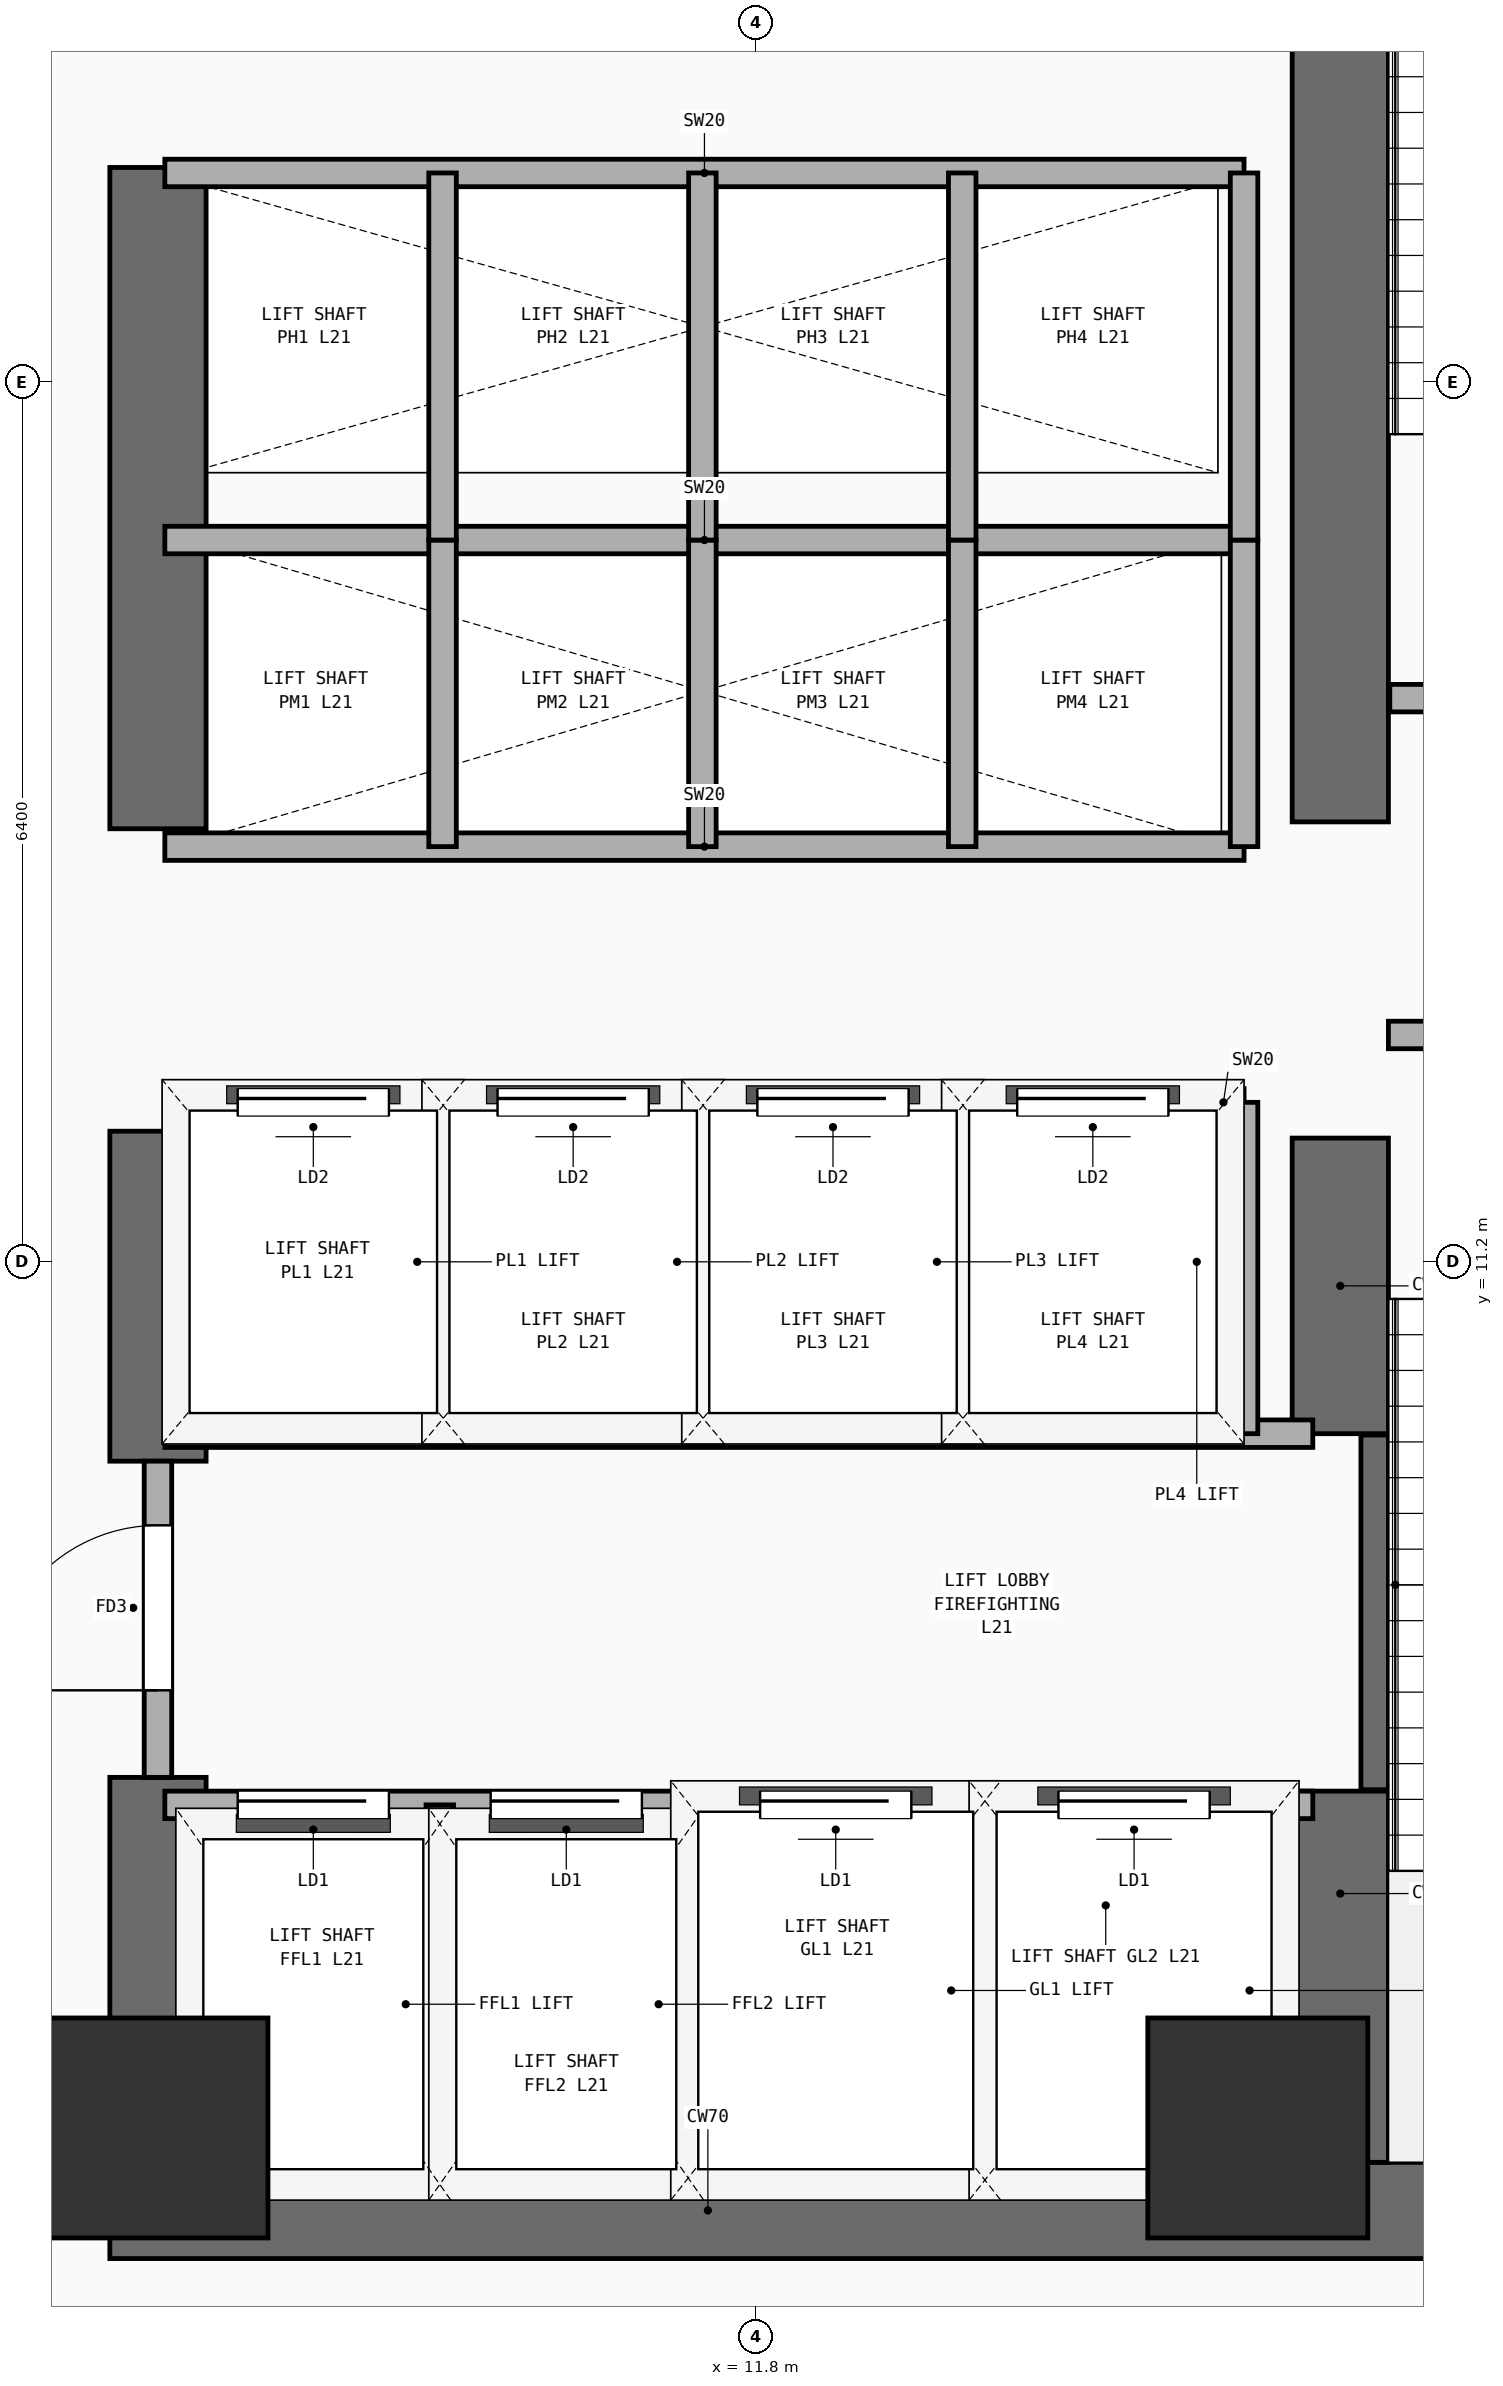
"""IFC4 building model, lengths in metres.
Left out: names, types, materials, properties, quantities, classifications, styles, units other than length and angle.
Written with IfcOpenShell. Run it as: python <this file> out.ifc"""

import sys

from ifc_helpers import new_model, si_unit, direction, frame, frame_2d, origin, origin_2d, place, context, subcontext, project, spatial, rectangle, extrude, element, fill, save


model = new_model("IFC4")
c1 = context("Model", 3, precision=1e-05, world=origin(), true_north=direction((0.0, 1.0)))
c2 = subcontext(c1, "Body", "Model", "MODEL_VIEW")
j1 = project(units=[si_unit("LENGTHUNIT", "METRE"), si_unit("PLANEANGLEUNIT", "RADIAN")], contexts=[c1])
p1 = place(None, origin())
s1 = spatial("IfcSite", under=j1, at=p1, CompositionType="ELEMENT")
p2 = place(p1, origin())
s2 = spatial("IfcBuilding", under=s1, at=p2, CompositionType="ELEMENT")
p3 = place(p2, frame((0.0, 0.0, 82.8)))
s3 = spatial("IfcBuildingStorey", under=s2, at=p3, CompositionType="ELEMENT", Elevation=82.8)
p4 = place(p3, frame((7.1, 4.3, 0.0), z_axis=(0.0, 0.0, 1.0), x_axis=(1.0, 0.0, 0.0)))
e1 = element("IfcWall", 1, at=p4, inside=s3, PredefinedType="SHEAR", context=c2, shape_type="SweptSolid", body=[
    extrude(rectangle(XDim=14.05, YDim=0.7, at=frame_2d((7.025, 0.0))), origin(), (0.0, 0.0, 1.0), 4.84),
])
p5 = place(p3, frame((7.45, 4.65, 0.0), z_axis=(0.0, 0.0, 1.0), x_axis=(0.0, 1.0, 0.0)))
e2 = element("IfcWall", 2, at=p5, inside=s3, PredefinedType="SHEAR", context=c2, shape_type="SweptSolid", body=[
    extrude(rectangle(XDim=2.8, YDim=0.7, at=frame_2d((1.4, 0.0))), origin(), (0.0, 0.0, 1.0), 4.84),
])
p6 = place(p3, frame((7.45, 9.75, 0.0), z_axis=(0.0, 0.0, 1.0), x_axis=(0.0, 1.0, 0.0)))
e3 = element("IfcWall", 3, at=p6, inside=s3, PredefinedType="SHEAR", context=c2, shape_type="SweptSolid", body=[
    extrude(rectangle(XDim=2.4, YDim=0.7, at=frame_2d((1.2, 0.0))), origin(), (0.0, 0.0, 1.0), 4.84),
])
p7 = place(p3, frame((7.45, 14.35, 0.0), z_axis=(0.0, 0.0, 1.0), x_axis=(0.0, 1.0, 0.0)))
e4 = element("IfcWall", 4, at=p7, inside=s3, PredefinedType="SHEAR", context=c2, shape_type="SweptSolid", body=[
    extrude(rectangle(XDim=4.81, YDim=0.7, at=frame_2d((2.405, 0.0))), origin(), (0.0, 0.0, 1.0), 4.84),
])
p8 = place(p3, frame((16.05, 4.65, 0.0), z_axis=(0.0, 0.0, 1.0), x_axis=(0.0, 1.0, 0.0)))
e5 = element("IfcWall", 5, at=p8, inside=s3, PredefinedType="SHEAR", context=c2, shape_type="SweptSolid", body=[
    extrude(rectangle(XDim=2.7, YDim=0.7, at=frame_2d((1.35, 0.0))), origin(), (0.0, 0.0, 1.0), 4.84),
])
p9 = place(p3, frame((16.05, 9.95, 0.0), z_axis=(0.0, 0.0, 1.0), x_axis=(0.0, 1.0, 0.0)))
e6 = element("IfcWall", 6, at=p9, inside=s3, PredefinedType="SHEAR", context=c2, shape_type="SweptSolid", body=[
    extrude(rectangle(XDim=2.15, YDim=0.7, at=frame_2d((1.075, 0.0))), origin(), (0.0, 0.0, 1.0), 4.84),
])
p10 = place(p3, frame((16.05, 14.4, 0.0), z_axis=(0.0, 0.0, 1.0), x_axis=(0.0, 1.0, 0.0)))
e7 = element("IfcWall", 7, at=p10, inside=s3, PredefinedType="SHEAR", context=c2, shape_type="SweptSolid", body=[
    extrude(rectangle(XDim=9.1, YDim=0.7, at=frame_2d((4.55, 0.0))), origin(), (0.0, 0.0, 1.0), 4.84),
])
for number, where, z_axis, x_axis in (
    (8, (7.45, 4.9, 0.0), (0.0, 0.0, 1.0), (1.0, 0.0, 0.0)),
    (9, (15.45, 4.9, 0.0), (0.0, 0.0, 1.0), (1.0, 0.0, 0.0)),
):
    element("IfcColumn", number, at=place(p3, frame(where, z_axis=z_axis, x_axis=x_axis)), inside=s3, PredefinedType="COLUMN", context=c2, shape_type="SweptSolid", body=[
        extrude(rectangle(XDim=1.6, YDim=1.6, at=origin_2d()), origin(), (0.0, 0.0, 1.0), 4.84),
    ])
p11 = place(p3, frame((16.3, 7.36, 0.0), z_axis=(0.0, 0.0, 1.0), x_axis=(0.0, 1.0, 0.0)))
e10 = element("IfcWall", 10, at=p11, inside=s3, PredefinedType="SHEAR", context=c2, shape_type="SweptSolid", body=[
    extrude(rectangle(XDim=2.58, YDim=0.2, at=frame_2d((1.29, 0.0))), origin(), (0.0, 0.0, 1.0), 4.84),
])
p12 = place(p3, frame((16.4, 12.85, 0.0), z_axis=(0.0, 0.0, 1.0), x_axis=(1.0, 0.0, 0.0)))
e11 = element("IfcWall", 11, at=p12, inside=s3, PredefinedType="PARTITIONING", context=c2, shape_type="SweptSolid", body=[
    extrude(rectangle(XDim=3.96, YDim=0.2, at=frame_2d((1.98, 0.0))), origin(), (0.0, 0.0, 1.0), 4.84),
])
p13 = place(p12, frame((1.304, 0.0, 0.0)))
e12 = element("IfcOpeningElement", 12, at=p13, cuts=e11, PredefinedType="OPENING", context=c2, shape_type="SweptSolid", body=[
    extrude(rectangle(XDim=1.1, YDim=2.2, at=frame_2d((0.55, 1.1))), frame((0.0, 0.11, 0.0), z_axis=(0.0, -1.0, 0.0), x_axis=(1.0, 0.0, 0.0)), (0.0, 0.0, 1.0), 0.22),
])
p14 = place(p3, frame((16.41, 15.3, 0.0), z_axis=(0.0, 0.0, 1.0), x_axis=(1.0, 0.0, 0.0)))
e13 = element("IfcWall", 13, at=p14, inside=s3, PredefinedType="PARTITIONING", context=c2, shape_type="SweptSolid", body=[
    extrude(rectangle(XDim=3.95, YDim=0.2, at=frame_2d((1.975, 0.0))), origin(), (0.0, 0.0, 1.0), 4.84),
])
p15 = place(p14, frame((1.294, 0.0, 0.0)))
e14 = element("IfcOpeningElement", 14, at=p15, cuts=e13, PredefinedType="OPENING", context=c2, shape_type="SweptSolid", body=[
    extrude(rectangle(XDim=1.1, YDim=2.2, at=frame_2d((0.55, 1.1))), frame((0.0, 0.11, 0.0), z_axis=(0.0, -1.0, 0.0), x_axis=(1.0, 0.0, 0.0)), (0.0, 0.0, 1.0), 0.22),
])
p16 = place(p3, frame((7.5, 7.25, 0.0), z_axis=(0.0, 0.0, 1.0), x_axis=(1.0, 0.0, 0.0)))
e15 = element("IfcWall", 15, at=p16, inside=s3, PredefinedType="PARTITIONING", context=c2, shape_type="SweptSolid", body=[
    extrude(rectangle(XDim=8.35, YDim=0.2, at=frame_2d((4.175, 0.0))), origin(), (0.0, 0.0, 1.0), 4.84),
])
p17 = place(p16, frame((0.53, 0.0, 0.0)))
e16 = element("IfcOpeningElement", 16, at=p17, cuts=e15, PredefinedType="OPENING", context=c2, shape_type="SweptSolid", body=[
    extrude(rectangle(XDim=1.1, YDim=2.2, at=frame_2d((0.55, 1.1))), frame((0.0, 0.11, 0.0), z_axis=(0.0, -1.0, 0.0), x_axis=(1.0, 0.0, 0.0)), (0.0, 0.0, 1.0), 0.22),
])
p18 = place(p16, frame((2.37, 0.0, 0.0)))
e17 = element("IfcOpeningElement", 17, at=p18, cuts=e15, PredefinedType="OPENING", context=c2, shape_type="SweptSolid", body=[
    extrude(rectangle(XDim=1.1, YDim=2.2, at=frame_2d((0.55, 1.1))), frame((0.0, 0.11, 0.0), z_axis=(0.0, -1.0, 0.0), x_axis=(1.0, 0.0, 0.0)), (0.0, 0.0, 1.0), 0.22),
])
p19 = place(p16, frame((4.33, 0.0, 0.0)))
e18 = element("IfcOpeningElement", 18, at=p19, cuts=e15, PredefinedType="OPENING", context=c2, shape_type="SweptSolid", body=[
    extrude(rectangle(XDim=1.1, YDim=2.2, at=frame_2d((0.55, 1.1))), frame((0.0, 0.11, 0.0), z_axis=(0.0, -1.0, 0.0), x_axis=(1.0, 0.0, 0.0)), (0.0, 0.0, 1.0), 0.22),
])
p20 = place(p16, frame((6.5, 0.0, 0.0)))
e19 = element("IfcOpeningElement", 19, at=p20, cuts=e15, PredefinedType="OPENING", context=c2, shape_type="SweptSolid", body=[
    extrude(rectangle(XDim=1.1, YDim=2.2, at=frame_2d((0.55, 1.1))), frame((0.0, 0.11, 0.0), z_axis=(0.0, -1.0, 0.0), x_axis=(1.0, 0.0, 0.0)), (0.0, 0.0, 1.0), 0.22),
])
p21 = place(p3, frame((7.5, 9.95, 0.0), z_axis=(0.0, 0.0, 1.0), x_axis=(1.0, 0.0, 0.0)))
e20 = element("IfcWall", 20, at=p21, inside=s3, PredefinedType="PARTITIONING", context=c2, shape_type="SweptSolid", body=[
    extrude(rectangle(XDim=8.35, YDim=0.2, at=frame_2d((4.175, 0.0))), origin(), (0.0, 0.0, 1.0), 4.84),
])
for number, where, z_axis, x_axis in (
    (21, (9.5, 4.45, 0.0), (0.0, 0.0, 1.0), (0.0, 1.0, 0.0)),
    (22, (11.36, 4.45, 0.0), (0.0, 0.0, 1.0), (0.0, 1.0, 0.0)),
    (23, (13.46, 4.45, 0.0), (0.0, 0.0, 1.0), (0.0, 1.0, 0.0)),
):
    element("IfcWall", number, at=place(p3, frame(where, z_axis=z_axis, x_axis=x_axis)), inside=s3, PredefinedType="PARTITIONING", context=c2, shape_type="SweptSolid", body=[
        extrude(rectangle(XDim=2.8, YDim=0.2, at=frame_2d((1.4, 0.0))), origin(), (0.0, 0.0, 1.0), 4.84),
    ])
p22 = place(p3, frame((7.45, 7.45, 0.0), z_axis=(0.0, 0.0, 1.0), x_axis=(0.0, 1.0, 0.0)))
e24 = element("IfcWall", 24, at=p22, inside=s3, PredefinedType="PARTITIONING", context=c2, shape_type="SweptSolid", body=[
    extrude(rectangle(XDim=2.3, YDim=0.2, at=frame_2d((1.15, 0.0))), origin(), (0.0, 0.0, 1.0), 3.62),
])
p23 = place(p22, frame((0.633, 0.0, 0.0)))
e25 = element("IfcOpeningElement", 25, at=p23, cuts=e24, PredefinedType="OPENING", context=c2, shape_type="SweptSolid", body=[
    extrude(rectangle(XDim=1.2, YDim=2.25, at=frame_2d((0.6, 1.125))), frame((0.0, 0.11, 0.0), z_axis=(0.0, -1.0, 0.0), x_axis=(1.0, 0.0, 0.0)), (0.0, 0.0, 1.0), 0.22),
])
p24 = place(p3, frame((7.5, 12.36, 0.0), z_axis=(0.0, 0.0, 1.0), x_axis=(1.0, 0.0, 0.0)))
e26 = element("IfcWall", 26, at=p24, inside=s3, PredefinedType="PARTITIONING", context=c2, shape_type="SweptSolid", body=[
    extrude(rectangle(XDim=7.85, YDim=0.2, at=frame_2d((3.925, 0.0))), origin(), (0.0, 0.0, 1.0), 4.84),
])
p25 = place(p24, frame((0.53, 0.0, 0.0)))
e27 = element("IfcOpeningElement", 27, at=p25, cuts=e26, PredefinedType="OPENING", context=c2, shape_type="SweptSolid", body=[
    extrude(rectangle(XDim=1.1, YDim=2.2, at=frame_2d((0.55, 1.1))), frame((0.0, 0.11, 0.0), z_axis=(0.0, -1.0, 0.0), x_axis=(1.0, 0.0, 0.0)), (0.0, 0.0, 1.0), 0.22),
])
p26 = place(p24, frame((2.42, 0.0, 0.0)))
e28 = element("IfcOpeningElement", 28, at=p26, cuts=e26, PredefinedType="OPENING", context=c2, shape_type="SweptSolid", body=[
    extrude(rectangle(XDim=1.1, YDim=2.2, at=frame_2d((0.55, 1.1))), frame((0.0, 0.11, 0.0), z_axis=(0.0, -1.0, 0.0), x_axis=(1.0, 0.0, 0.0)), (0.0, 0.0, 1.0), 0.22),
])
p27 = place(p24, frame((4.31, 0.0, 0.0)))
e29 = element("IfcOpeningElement", 29, at=p27, cuts=e26, PredefinedType="OPENING", context=c2, shape_type="SweptSolid", body=[
    extrude(rectangle(XDim=1.1, YDim=2.2, at=frame_2d((0.55, 1.1))), frame((0.0, 0.11, 0.0), z_axis=(0.0, -1.0, 0.0), x_axis=(1.0, 0.0, 0.0)), (0.0, 0.0, 1.0), 0.22),
])
p28 = place(p24, frame((6.2, 0.0, 0.0)))
e30 = element("IfcOpeningElement", 30, at=p28, cuts=e26, PredefinedType="OPENING", context=c2, shape_type="SweptSolid", body=[
    extrude(rectangle(XDim=1.1, YDim=2.2, at=frame_2d((0.55, 1.1))), frame((0.0, 0.11, 0.0), z_axis=(0.0, -1.0, 0.0), x_axis=(1.0, 0.0, 0.0)), (0.0, 0.0, 1.0), 0.22),
])
for number, where, z_axis, x_axis in (
    (31, (15.35, 9.95, 0.0), (0.0, 0.0, 1.0), (0.0, 1.0, 0.0)),
    (32, (9.52, 9.95, 0.0), (0.0, 0.0, 1.0), (0.0, 1.0, 0.0)),
    (33, (11.41, 9.95, 0.0), (0.0, 0.0, 1.0), (0.0, 1.0, 0.0)),
    (34, (13.3, 9.95, 0.0), (0.0, 0.0, 1.0), (0.0, 1.0, 0.0)),
):
    element("IfcWall", number, at=place(p3, frame(where, z_axis=z_axis, x_axis=x_axis)), inside=s3, PredefinedType="PARTITIONING", context=c2, shape_type="SweptSolid", body=[
        extrude(rectangle(XDim=2.41, YDim=0.2, at=frame_2d((1.205, 0.0))), origin(), (0.0, 0.0, 1.0), 4.84),
    ])
for number, where, z_axis, x_axis in (
    (35, (7.5, 14.22, 0.0), (0.0, 0.0, 1.0), (1.0, 0.0, 0.0)),
    (36, (7.5, 16.45, 0.0), (0.0, 0.0, 1.0), (1.0, 0.0, 0.0)),
):
    element("IfcWall", number, at=place(p3, frame(where, z_axis=z_axis, x_axis=x_axis)), inside=s3, PredefinedType="PARTITIONING", context=c2, shape_type="SweptSolid", body=[
        extrude(rectangle(XDim=7.85, YDim=0.2, at=frame_2d((3.925, 0.0))), origin(), (0.0, 0.0, 1.0), 4.84),
    ])
for number, where, z_axis, x_axis in (
    (37, (15.35, 14.22, 0.0), (0.0, 0.0, 1.0), (0.0, 1.0, 0.0)),
    (38, (9.52, 14.22, 0.0), (0.0, 0.0, 1.0), (0.0, 1.0, 0.0)),
    (39, (11.41, 14.22, 0.0), (0.0, 0.0, 1.0), (0.0, 1.0, 0.0)),
    (40, (13.3, 14.22, 0.0), (0.0, 0.0, 1.0), (0.0, 1.0, 0.0)),
):
    element("IfcWall", number, at=place(p3, frame(where, z_axis=z_axis, x_axis=x_axis)), inside=s3, PredefinedType="PARTITIONING", context=c2, shape_type="SweptSolid", body=[
        extrude(rectangle(XDim=2.23, YDim=0.2, at=frame_2d((1.115, 0.0))), origin(), (0.0, 0.0, 1.0), 4.84),
    ])
p29 = place(p3, frame((7.5, 19.12, 0.0), z_axis=(0.0, 0.0, 1.0), x_axis=(1.0, 0.0, 0.0)))
e41 = element("IfcWall", 41, at=p29, inside=s3, PredefinedType="PARTITIONING", context=c2, shape_type="SweptSolid", body=[
    extrude(rectangle(XDim=7.85, YDim=0.2, at=frame_2d((3.925, 0.0))), origin(), (0.0, 0.0, 1.0), 4.84),
])
for number, where, z_axis, x_axis in (
    (42, (15.35, 16.45, 0.0), (0.0, 0.0, 1.0), (0.0, 1.0, 0.0)),
    (43, (9.52, 16.45, 0.0), (0.0, 0.0, 1.0), (0.0, 1.0, 0.0)),
    (44, (11.41, 16.45, 0.0), (0.0, 0.0, 1.0), (0.0, 1.0, 0.0)),
    (45, (13.3, 16.45, 0.0), (0.0, 0.0, 1.0), (0.0, 1.0, 0.0)),
):
    element("IfcWall", number, at=place(p3, frame(where, z_axis=z_axis, x_axis=x_axis)), inside=s3, PredefinedType="PARTITIONING", context=c2, shape_type="SweptSolid", body=[
        extrude(rectangle(XDim=2.67, YDim=0.2, at=frame_2d((1.335, 0.0))), origin(), (0.0, 0.0, 1.0), 4.84),
    ])
p30 = place(p17, origin())
e46 = element("IfcDoor", 46, at=p30, inside=s3, OperationType="SLIDING_TO_LEFT", PredefinedType="DOOR", context=c2, shape_type="SweptSolid", body=[
    extrude(rectangle(XDim=1.1, YDim=2.2, at=frame_2d((0.55, 1.1))), frame((0.0, 0.025, 0.0), z_axis=(0.0, -1.0, 0.0), x_axis=(1.0, 0.0, 0.0)), (0.0, 0.0, 1.0), 0.05),
])
fill(e16, e46)
p31 = place(p18, origin())
e47 = element("IfcDoor", 47, at=p31, inside=s3, OperationType="SLIDING_TO_LEFT", PredefinedType="DOOR", context=c2, shape_type="SweptSolid", body=[
    extrude(rectangle(XDim=1.1, YDim=2.2, at=frame_2d((0.55, 1.1))), frame((0.0, 0.025, 0.0), z_axis=(0.0, -1.0, 0.0), x_axis=(1.0, 0.0, 0.0)), (0.0, 0.0, 1.0), 0.05),
])
fill(e17, e47)
p32 = place(p19, origin())
e48 = element("IfcDoor", 48, at=p32, inside=s3, OperationType="SLIDING_TO_LEFT", PredefinedType="DOOR", context=c2, shape_type="SweptSolid", body=[
    extrude(rectangle(XDim=1.1, YDim=2.2, at=frame_2d((0.55, 1.1))), frame((0.0, 0.025, 0.0), z_axis=(0.0, -1.0, 0.0), x_axis=(1.0, 0.0, 0.0)), (0.0, 0.0, 1.0), 0.05),
])
fill(e18, e48)
p33 = place(p20, origin())
e49 = element("IfcDoor", 49, at=p33, inside=s3, OperationType="SLIDING_TO_LEFT", PredefinedType="DOOR", context=c2, shape_type="SweptSolid", body=[
    extrude(rectangle(XDim=1.1, YDim=2.2, at=frame_2d((0.55, 1.1))), frame((0.0, 0.025, 0.0), z_axis=(0.0, -1.0, 0.0), x_axis=(1.0, 0.0, 0.0)), (0.0, 0.0, 1.0), 0.05),
])
fill(e19, e49)
p34 = place(p23, frame((1.2, 0.0, 0.0), z_axis=(0.0, 0.0, 1.0), x_axis=(-1.0, 0.0, 0.0)))
e50 = element("IfcDoor", 50, at=p34, inside=s3, OperationType="SINGLE_SWING_RIGHT", PredefinedType="DOOR", context=c2, shape_type="SweptSolid", body=[
    extrude(rectangle(XDim=1.2, YDim=2.25, at=frame_2d((0.6, 1.125))), frame((0.0, 0.025, 0.0), z_axis=(0.0, -1.0, 0.0), x_axis=(1.0, 0.0, 0.0)), (0.0, 0.0, 1.0), 0.05),
])
fill(e25, e50)
p35 = place(p25, origin())
e51 = element("IfcDoor", 51, at=p35, inside=s3, OperationType="SLIDING_TO_LEFT", PredefinedType="DOOR", context=c2, shape_type="SweptSolid", body=[
    extrude(rectangle(XDim=1.1, YDim=2.2, at=frame_2d((0.55, 1.1))), frame((0.0, 0.025, 0.0), z_axis=(0.0, -1.0, 0.0), x_axis=(1.0, 0.0, 0.0)), (0.0, 0.0, 1.0), 0.05),
])
fill(e27, e51)
p36 = place(p26, origin())
e52 = element("IfcDoor", 52, at=p36, inside=s3, OperationType="SLIDING_TO_LEFT", PredefinedType="DOOR", context=c2, shape_type="SweptSolid", body=[
    extrude(rectangle(XDim=1.1, YDim=2.2, at=frame_2d((0.55, 1.1))), frame((0.0, 0.025, 0.0), z_axis=(0.0, -1.0, 0.0), x_axis=(1.0, 0.0, 0.0)), (0.0, 0.0, 1.0), 0.05),
])
fill(e28, e52)
p37 = place(p27, origin())
e53 = element("IfcDoor", 53, at=p37, inside=s3, OperationType="SLIDING_TO_LEFT", PredefinedType="DOOR", context=c2, shape_type="SweptSolid", body=[
    extrude(rectangle(XDim=1.1, YDim=2.2, at=frame_2d((0.55, 1.1))), frame((0.0, 0.025, 0.0), z_axis=(0.0, -1.0, 0.0), x_axis=(1.0, 0.0, 0.0)), (0.0, 0.0, 1.0), 0.05),
])
fill(e29, e53)
p38 = place(p28, origin())
e54 = element("IfcDoor", 54, at=p38, inside=s3, OperationType="SLIDING_TO_LEFT", PredefinedType="DOOR", context=c2, shape_type="SweptSolid", body=[
    extrude(rectangle(XDim=1.1, YDim=2.2, at=frame_2d((0.55, 1.1))), frame((0.0, 0.025, 0.0), z_axis=(0.0, -1.0, 0.0), x_axis=(1.0, 0.0, 0.0)), (0.0, 0.0, 1.0), 0.05),
])
fill(e30, e54)
save(model, sys.argv[1])
